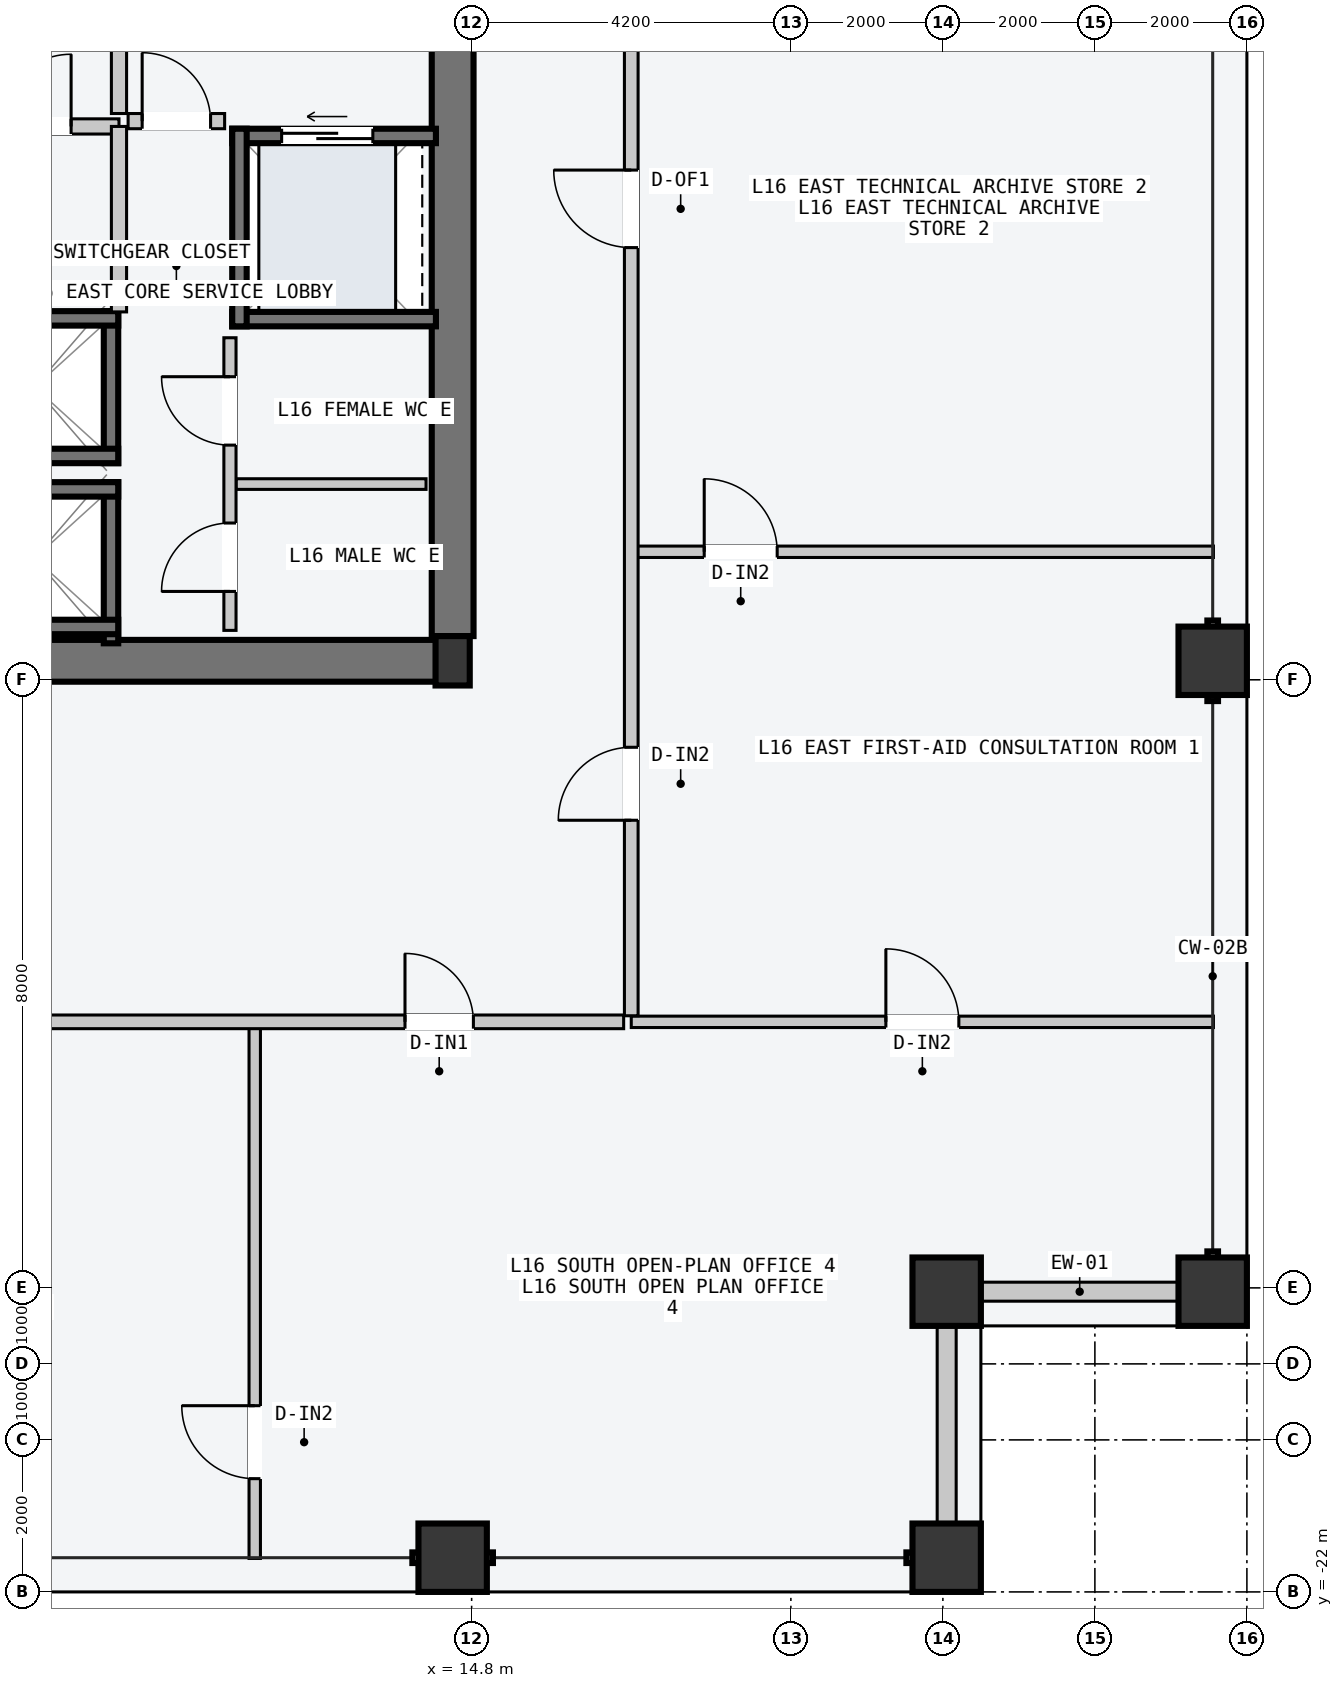
"""IFC4 building model, lengths in metres.
Left out: names, types, materials, properties, quantities, classifications, styles, units other than length and angle.
Written with IfcOpenShell. Run it as: python <this file> out.ifc"""

import sys

from ifc_helpers import new_model, si_unit, direction, frame, frame_2d, origin, origin_2d, place, context, subcontext, project, spatial, rectangle, hollow_rectangle, i_section, extrude, element, fill, save


model = new_model("IFC4")
c1 = context("Model", 3, precision=1e-05, world=origin(), true_north=direction((0.0, 1.0)))
c2 = subcontext(c1, "Body", "Model", "MODEL_VIEW")
j1 = project(units=[si_unit("LENGTHUNIT", "METRE"), si_unit("PLANEANGLEUNIT", "RADIAN")], contexts=[c1])
p1 = place(None, origin())
s1 = spatial("IfcSite", under=j1, at=p1, CompositionType="ELEMENT")
p2 = place(p1, origin())
s2 = spatial("IfcBuilding", under=s1, at=p2, CompositionType="ELEMENT")
p3 = place(p2, frame((0.0, 0.0, 63.6)))
s3 = spatial("IfcBuildingStorey", under=s2, at=p3, CompositionType="ELEMENT", Elevation=63.6)
p4 = place(p3, frame((8.07, -9.75, -0.2), z_axis=(0.0, 0.0, 1.0), x_axis=(1.0, 0.0, 0.0)))
e1 = element("IfcWall", 1, at=p4, inside=s3, PredefinedType="SHEAR", context=c2, shape_type="SweptSolid", body=[
    extrude(rectangle(XDim=6.46, YDim=0.55, at=frame_2d((3.23, 0.0))), origin(), (0.0, 0.0, 1.0), 3.6),
])
p5 = place(p3, frame((14.55, -9.425, -0.2), z_axis=(0.0, 0.0, 1.0), x_axis=(0.0, 1.0, 0.0)))
e2 = element("IfcWall", 2, at=p5, inside=s3, PredefinedType="SHEAR", context=c2, shape_type="SweptSolid", body=[
    extrude(rectangle(XDim=9.1, YDim=0.55, at=frame_2d((4.55, 0.0))), origin(), (0.0, 0.0, 1.0), 3.6),
])
p6 = place(p3, frame((14.55, -9.75, 0.0), z_axis=(0.0, 0.0, 1.0), x_axis=(1.0, 0.0, 0.0)))
e3 = element("IfcColumn", 3, at=p6, inside=s3, PredefinedType="COLUMN", context=c2, shape_type="SweptSolid", body=[
    extrude(i_section(OverallWidth=0.45, OverallDepth=0.65, WebThickness=0.025, FlangeThickness=0.04, at=origin_2d()), origin(), (0.0, 0.0, 1.0), 3.6),
])
for number, where, z_axis, x_axis in (
    (4, (14.55, -21.55, 0.0), (0.0, 0.0, 1.0), (1.0, 0.0, 0.0)),
    (5, (21.05, -21.55, 0.0), (0.0, 0.0, 1.0), (1.0, 0.0, 0.0)),
    (6, (24.55, -18.05, 0.0), (0.0, 0.0, 1.0), (0.0, 1.0, 0.0)),
    (7, (24.55, -9.75, 0.0), (0.0, 0.0, 1.0), (0.0, 1.0, 0.0)),
    (8, (21.05, -18.05, 0.0), (0.0, 0.0, 1.0), (1.0, 0.0, 0.0)),
):
    element("IfcColumn", number, at=place(p3, frame(where, z_axis=z_axis, x_axis=x_axis)), inside=s3, PredefinedType="COLUMN", context=c2, shape_type="SweptSolid", body=[
        extrude(hollow_rectangle(XDim=0.9, YDim=0.9, WallThickness=0.045, at=origin_2d()), origin(), (0.0, 0.0, 1.0), 3.6),
    ])
for number, where, z_axis, x_axis in (
    (9, (21.51, -18.05, 0.0), (0.0, 0.0, 1.0), (1.0, 0.0, 0.0)),
    (10, (21.05, -21.09, 0.0), (0.0, 0.0, 1.0), (0.0, 1.0, 0.0)),
):
    element("IfcWall", number, at=place(p3, frame(where, z_axis=z_axis, x_axis=x_axis)), inside=s3, PredefinedType="STANDARD", context=c2, shape_type="SweptSolid", body=[
        extrude(rectangle(XDim=2.58, YDim=0.25, at=frame_2d((1.29, 0.0))), origin(), (0.0, 0.0, 1.0), 2.7),
    ])
p7 = place(p3, frame((10.055, -9.52, -0.2), z_axis=(0.0, 0.0, 1.0), x_axis=(0.0, 1.0, 0.0)))
e11 = element("IfcWall", 11, at=p7, inside=s3, PredefinedType="SOLIDWALL", context=c2, shape_type="SweptSolid", body=[
    extrude(rectangle(XDim=2.12, YDim=0.19, at=frame_2d((1.06, 0.0))), origin(), (0.0, 0.0, 1.0), 3.6),
])
for number, where, z_axis, x_axis in (
    (12, (7.95, -7.495, -0.2), (0.0, 0.0, 1.0), (1.0, 0.0, 0.0)),
    (13, (7.95, -9.305, -0.2), (0.0, 0.0, 1.0), (1.0, 0.0, 0.0)),
):
    element("IfcWall", number, at=place(p3, frame(where, z_axis=z_axis, x_axis=x_axis)), inside=s3, PredefinedType="SOLIDWALL", context=c2, shape_type="SweptSolid", body=[
        extrude(rectangle(XDim=2.2, YDim=0.19, at=frame_2d((1.1, 0.0))), origin(), (0.0, 0.0, 1.0), 3.6),
    ])
p8 = place(p3, frame((10.055, -7.15, -0.2), z_axis=(0.0, 0.0, 1.0), x_axis=(0.0, 1.0, 0.0)))
e14 = element("IfcWall", 14, at=p8, inside=s3, PredefinedType="SOLIDWALL", context=c2, shape_type="SweptSolid", body=[
    extrude(rectangle(XDim=2.0, YDim=0.19, at=frame_2d((1.0, 0.0))), origin(), (0.0, 0.0, 1.0), 3.6),
])
for number, where, z_axis, x_axis in (
    (15, (7.95, -5.245, -0.2), (0.0, 0.0, 1.0), (1.0, 0.0, 0.0)),
    (16, (7.95, -7.055, -0.2), (0.0, 0.0, 1.0), (1.0, 0.0, 0.0)),
):
    element("IfcWall", number, at=place(p3, frame(where, z_axis=z_axis, x_axis=x_axis)), inside=s3, PredefinedType="SOLIDWALL", context=c2, shape_type="SweptSolid", body=[
        extrude(rectangle(XDim=2.2, YDim=0.19, at=frame_2d((1.1, 0.0))), origin(), (0.0, 0.0, 1.0), 3.6),
    ])
p9 = place(p3, frame((11.65, -2.845, -0.2), z_axis=(0.0, 0.0, 1.0), x_axis=(1.0, 0.0, 0.0)))
e17 = element("IfcWall", 17, at=p9, inside=s3, PredefinedType="SOLIDWALL", context=c2, shape_type="SweptSolid", body=[
    extrude(rectangle(XDim=2.68, YDim=0.19, at=frame_2d((1.34, 0.0))), origin(), (0.0, 0.0, 1.0), 3.6),
])
p10 = place(p9, frame((0.65, 0.0, 0.2)))
e18 = element("IfcOpeningElement", 18, at=p10, cuts=e17, PredefinedType="OPENING", context=c2, shape_type="SweptSolid", body=[
    extrude(rectangle(XDim=1.2, YDim=2.2, at=frame_2d((0.6, 1.1))), frame((0.0, 0.105, 0.0), z_axis=(0.0, -1.0, 0.0), x_axis=(1.0, 0.0, 0.0)), (0.0, 0.0, 1.0), 0.21),
])
p11 = place(p3, frame((11.65, -5.255, -0.2), z_axis=(0.0, 0.0, 1.0), x_axis=(1.0, 0.0, 0.0)))
e19 = element("IfcWall", 19, at=p11, inside=s3, PredefinedType="SOLIDWALL", context=c2, shape_type="SweptSolid", body=[
    extrude(rectangle(XDim=2.68, YDim=0.19, at=frame_2d((1.34, 0.0))), origin(), (0.0, 0.0, 1.0), 3.6),
])
p12 = place(p3, frame((11.745, -5.35, -0.2), z_axis=(0.0, 0.0, 1.0), x_axis=(0.0, 1.0, 0.0)))
e20 = element("IfcWall", 20, at=p12, inside=s3, PredefinedType="SOLIDWALL", context=c2, shape_type="SweptSolid", body=[
    extrude(rectangle(XDim=2.6, YDim=0.19, at=frame_2d((1.3, 0.0))), origin(), (0.0, 0.0, 1.0), 3.6),
])
p13 = place(p3, frame((10.16, -2.55, 0.0), z_axis=(0.0, 0.0, 1.0), x_axis=(0.0, 1.0, 0.0)))
e21 = element("IfcWall", 21, at=p13, inside=s3, PredefinedType="PARTITIONING", context=c2, shape_type="SweptSolid", body=[
    extrude(rectangle(XDim=3.4, YDim=0.2, at=frame_2d((1.7, 0.0))), origin(), (0.0, 0.0, 1.0), 3.4),
])
p14 = place(p13, frame((1.3, 0.0, 0.0)))
e22 = element("IfcOpeningElement", 22, at=p14, cuts=e21, PredefinedType="OPENING", context=c2, shape_type="SweptSolid", body=[
    extrude(rectangle(XDim=1.1, YDim=2.15, at=frame_2d((0.55, 1.075))), frame((0.0, 0.11, 0.0), z_axis=(0.0, -1.0, 0.0), x_axis=(1.0, 0.0, 0.0)), (0.0, 0.0, 1.0), 0.22),
])
p15 = place(p3, frame((10.28, -2.65, 0.0), z_axis=(0.0, 0.0, 1.0), x_axis=(1.0, 0.0, 0.0)))
e23 = element("IfcWall", 23, at=p15, inside=s3, PredefinedType="PARTITIONING", context=c2, shape_type="SweptSolid", body=[
    extrude(rectangle(XDim=1.27, YDim=0.2, at=frame_2d((0.635, 0.0))), origin(), (0.0, 0.0, 1.0), 3.4),
])
p16 = place(p15, frame((0.185, 0.0, 0.0)))
e24 = element("IfcOpeningElement", 24, at=p16, cuts=e23, PredefinedType="OPENING", context=c2, shape_type="SweptSolid", body=[
    extrude(rectangle(XDim=0.9, YDim=2.15, at=frame_2d((0.45, 1.075))), frame((0.0, 0.11, 0.0), z_axis=(0.0, -1.0, 0.0), x_axis=(1.0, 0.0, 0.0)), (0.0, 0.0, 1.0), 0.22),
])
p17 = place(p3, frame((7.96, -2.72, 0.0), z_axis=(0.0, 0.0, 1.0), x_axis=(1.0, 0.0, 0.0)))
e25 = element("IfcWall", 25, at=p17, inside=s3, PredefinedType="PARTITIONING", context=c2, shape_type="SweptSolid", body=[
    extrude(rectangle(XDim=2.2, YDim=0.2, at=frame_2d((1.1, 0.0))), origin(), (0.0, 0.0, 1.0), 3.4),
])
p18 = place(p17, frame((0.62, 0.0, 0.0)))
e26 = element("IfcOpeningElement", 26, at=p18, cuts=e25, PredefinedType="OPENING", context=c2, shape_type="SweptSolid", body=[
    extrude(rectangle(XDim=0.95, YDim=2.1, at=frame_2d((0.475, 1.05))), frame((0.0, 0.11, 0.0), z_axis=(0.0, -1.0, 0.0), x_axis=(1.0, 0.0, 0.0)), (0.0, 0.0, 1.0), 0.22),
])
p19 = place(p3, frame((10.16, -5.16, 0.0), z_axis=(0.0, 0.0, 1.0), x_axis=(0.0, 1.0, 0.0)))
e27 = element("IfcWall", 27, at=p19, inside=s3, PredefinedType="PARTITIONING", context=c2, shape_type="SweptSolid", body=[
    extrude(rectangle(XDim=2.44, YDim=0.2, at=frame_2d((1.22, 0.0))), origin(), (0.0, 0.0, 1.0), 3.4),
])
p20 = place(p3, frame((11.7, -7.425, 0.0), z_axis=(0.0, 0.0, 1.0), x_axis=(1.0, 0.0, 0.0)))
e28 = element("IfcWall", 28, at=p20, inside=s3, PredefinedType="PARTITIONING", context=c2, shape_type="SweptSolid", body=[
    extrude(rectangle(XDim=2.5, YDim=0.14, at=frame_2d((1.25, 0.0))), origin(), (0.0, 0.0, 1.0), 3.4),
])
p21 = place(p3, frame((11.62, -9.35, 0.0), z_axis=(0.0, 0.0, 1.0), x_axis=(0.0, 1.0, 0.0)))
e29 = element("IfcWall", 29, at=p21, inside=s3, PredefinedType="PARTITIONING", context=c2, shape_type="SweptSolid", body=[
    extrude(rectangle(XDim=3.85, YDim=0.16, at=frame_2d((1.925, 0.0))), origin(), (0.0, 0.0, 1.0), 3.4),
])
p22 = place(p21, frame((0.512, 0.0, 0.0)))
e30 = element("IfcOpeningElement", 30, at=p22, cuts=e29, PredefinedType="OPENING", context=c2, shape_type="SweptSolid", body=[
    extrude(rectangle(XDim=0.9, YDim=2.15, at=frame_2d((0.45, 1.075))), frame((0.0, 0.09, 0.0), z_axis=(0.0, -1.0, 0.0), x_axis=(1.0, 0.0, 0.0)), (0.0, 0.0, 1.0), 0.18),
])
p23 = place(p21, frame((2.438, 0.0, 0.0)))
e31 = element("IfcOpeningElement", 31, at=p23, cuts=e29, PredefinedType="OPENING", context=c2, shape_type="SweptSolid", body=[
    extrude(rectangle(XDim=0.9, YDim=2.15, at=frame_2d((0.45, 1.075))), frame((0.0, 0.09, 0.0), z_axis=(0.0, -1.0, 0.0), x_axis=(1.0, 0.0, 0.0)), (0.0, 0.0, 1.0), 0.18),
])
p24 = place(p3, frame((11.946, -21.56, 0.0), z_axis=(0.0, 0.0, 1.0), x_axis=(0.0, 1.0, 0.0)))
e32 = element("IfcWall", 32, at=p24, inside=s3, PredefinedType="PARTITIONING", context=c2, shape_type="SweptSolid", body=[
    extrude(rectangle(XDim=7.0, YDim=0.15, at=frame_2d((3.5, 0.0))), origin(), (0.0, 0.0, 1.0), 3.4),
])
p25 = place(p24, frame((1.05, 0.0, 0.0)))
e33 = element("IfcOpeningElement", 33, at=p25, cuts=e32, PredefinedType="OPENING", context=c2, shape_type="SweptSolid", body=[
    extrude(rectangle(XDim=0.96, YDim=2.18, at=frame_2d((0.48, 1.09))), frame((0.0, 0.085, 0.0), z_axis=(0.0, -1.0, 0.0), x_axis=(1.0, 0.0, 0.0)), (0.0, 0.0, 1.0), 0.17),
])
p26 = place(p3, frame((-16.8, -14.5, 0.0), z_axis=(0.0, 0.0, 1.0), x_axis=(1.0, 0.0, 0.0)))
e34 = element("IfcWall", 34, at=p26, inside=s3, PredefinedType="PARTITIONING", context=c2, shape_type="SweptSolid", body=[
    extrude(rectangle(XDim=33.6, YDim=0.18, at=frame_2d((16.8, 0.0))), origin(), (0.0, 0.0, 1.0), 3.4),
])
p27 = place(p26, frame((4.087, 0.0, 0.0)))
e35 = element("IfcOpeningElement", 35, at=p27, cuts=e34, PredefinedType="OPENING", context=c2, shape_type="SweptSolid", body=[
    extrude(rectangle(XDim=1.06, YDim=2.2, at=frame_2d((0.53, 1.1))), frame((0.0, 0.1, 0.0), z_axis=(0.0, -1.0, 0.0), x_axis=(1.0, 0.0, 0.0)), (0.0, 0.0, 1.0), 0.2),
])
p28 = place(p26, frame((13.791, 0.0, 0.0)))
e36 = element("IfcOpeningElement", 36, at=p28, cuts=e34, PredefinedType="OPENING", context=c2, shape_type="SweptSolid", body=[
    extrude(rectangle(XDim=1.24, YDim=2.24, at=frame_2d((0.62, 1.12))), frame((0.0, 0.1, 0.0), z_axis=(0.0, -1.0, 0.0), x_axis=(1.0, 0.0, 0.0)), (0.0, 0.0, 1.0), 0.2),
])
p29 = place(p26, frame((23.467, 0.0, 0.0)))
e37 = element("IfcOpeningElement", 37, at=p29, cuts=e34, PredefinedType="OPENING", context=c2, shape_type="SweptSolid", body=[
    extrude(rectangle(XDim=1.4, YDim=2.2, at=frame_2d((0.7, 1.1))), frame((0.0, 0.1, 0.0), z_axis=(0.0, -1.0, 0.0), x_axis=(1.0, 0.0, 0.0)), (0.0, 0.0, 1.0), 0.2),
])
p30 = place(p26, frame((30.723, 0.0, 0.0)))
e38 = element("IfcOpeningElement", 38, at=p30, cuts=e34, PredefinedType="OPENING", context=c2, shape_type="SweptSolid", body=[
    extrude(rectangle(XDim=0.9, YDim=2.15, at=frame_2d((0.45, 1.075))), frame((0.0, 0.1, 0.0), z_axis=(0.0, -1.0, 0.0), x_axis=(1.0, 0.0, 0.0)), (0.0, 0.0, 1.0), 0.2),
])
p31 = place(p3, frame((16.9, -14.5, 0.0), z_axis=(0.0, 0.0, 1.0), x_axis=(1.0, 0.0, 0.0)))
e39 = element("IfcWall", 39, at=p31, inside=s3, PredefinedType="PARTITIONING", context=c2, shape_type="SweptSolid", body=[
    extrude(rectangle(XDim=7.66, YDim=0.15, at=frame_2d((3.83, 0.0))), origin(), (0.0, 0.0, 1.0), 3.4),
])
p32 = place(p31, frame((3.35, 0.0, 0.0)))
e40 = element("IfcOpeningElement", 40, at=p32, cuts=e39, PredefinedType="OPENING", context=c2, shape_type="SweptSolid", body=[
    extrude(rectangle(XDim=0.96, YDim=2.18, at=frame_2d((0.48, 1.09))), frame((0.0, 0.085, 0.0), z_axis=(0.0, -1.0, 0.0), x_axis=(1.0, 0.0, 0.0)), (0.0, 0.0, 1.0), 0.17),
])
p33 = place(p3, frame((16.96, -8.316, 0.0), z_axis=(0.0, 0.0, 1.0), x_axis=(1.0, 0.0, 0.0)))
e41 = element("IfcWall", 41, at=p33, inside=s3, PredefinedType="PARTITIONING", context=c2, shape_type="SweptSolid", body=[
    extrude(rectangle(XDim=7.6, YDim=0.15, at=frame_2d((3.8, 0.0))), origin(), (0.0, 0.0, 1.0), 3.4),
])
p34 = place(p33, frame((0.9, 0.0, 0.0)))
e42 = element("IfcOpeningElement", 42, at=p34, cuts=e41, PredefinedType="OPENING", context=c2, shape_type="SweptSolid", body=[
    extrude(rectangle(XDim=0.96, YDim=2.18, at=frame_2d((0.48, 1.09))), frame((0.0, 0.085, 0.0), z_axis=(0.0, -1.0, 0.0), x_axis=(1.0, 0.0, 0.0)), (0.0, 0.0, 1.0), 0.17),
])
p35 = place(p3, frame((16.9, -14.42, 0.0), z_axis=(0.0, 0.0, 1.0), x_axis=(0.0, 1.0, 0.0)))
e43 = element("IfcWall", 43, at=p35, inside=s3, PredefinedType="PARTITIONING", context=c2, shape_type="SweptSolid", body=[
    extrude(rectangle(XDim=26.54, YDim=0.18, at=frame_2d((13.27, 0.0))), origin(), (0.0, 0.0, 1.0), 3.4),
])
p36 = place(p35, frame((2.572, 0.0, 0.0)))
e44 = element("IfcOpeningElement", 44, at=p36, cuts=e43, PredefinedType="OPENING", context=c2, shape_type="SweptSolid", body=[
    extrude(rectangle(XDim=0.96, YDim=2.18, at=frame_2d((0.48, 1.09))), frame((0.0, 0.1, 0.0), z_axis=(0.0, -1.0, 0.0), x_axis=(1.0, 0.0, 0.0)), (0.0, 0.0, 1.0), 0.2),
])
p37 = place(p35, frame((10.106, 0.0, 0.0)))
e45 = element("IfcOpeningElement", 45, at=p37, cuts=e43, PredefinedType="OPENING", context=c2, shape_type="SweptSolid", body=[
    extrude(rectangle(XDim=1.02, YDim=2.2, at=frame_2d((0.51, 1.1))), frame((0.0, 0.1, 0.0), z_axis=(0.0, -1.0, 0.0), x_axis=(1.0, 0.0, 0.0)), (0.0, 0.0, 1.0), 0.2),
])
p38 = place(p35, frame((20.304, 0.0, 0.0)))
e46 = element("IfcOpeningElement", 46, at=p38, cuts=e43, PredefinedType="OPENING", context=c2, shape_type="SweptSolid", body=[
    extrude(rectangle(XDim=1.06, YDim=2.2, at=frame_2d((0.53, 1.1))), frame((0.0, 0.1, 0.0), z_axis=(0.0, -1.0, 0.0), x_axis=(1.0, 0.0, 0.0)), (0.0, 0.0, 1.0), 0.2),
])
p39 = place(p10, origin())
e47 = element("IfcDoor", 47, at=p39, inside=s3, OperationType="SLIDING_TO_LEFT", PredefinedType="DOOR", context=c2, shape_type="SweptSolid", body=[
    extrude(rectangle(XDim=1.2, YDim=2.2, at=frame_2d((0.6, 1.1))), frame((0.0, 0.025, 0.0), z_axis=(0.0, -1.0, 0.0), x_axis=(1.0, 0.0, 0.0)), (0.0, 0.0, 1.0), 0.05),
])
fill(e18, e47)
p40 = place(p16, origin())
e48 = element("IfcDoor", 48, at=p40, inside=s3, OperationType="SINGLE_SWING_LEFT", PredefinedType="DOOR", context=c2, shape_type="SweptSolid", body=[
    extrude(rectangle(XDim=0.9, YDim=2.15, at=frame_2d((0.45, 1.075))), frame((0.0, 0.025, 0.0), z_axis=(0.0, -1.0, 0.0), x_axis=(1.0, 0.0, 0.0)), (0.0, 0.0, 1.0), 0.05),
])
fill(e24, e48)
p41 = place(p18, origin())
e49 = element("IfcDoor", 49, at=p41, inside=s3, OperationType="SINGLE_SWING_RIGHT", PredefinedType="DOOR", context=c2, shape_type="SweptSolid", body=[
    extrude(rectangle(XDim=0.95, YDim=2.1, at=frame_2d((0.475, 1.05))), frame((0.0, 0.025, 0.0), z_axis=(0.0, -1.0, 0.0), x_axis=(1.0, 0.0, 0.0)), (0.0, 0.0, 1.0), 0.05),
])
fill(e26, e49)
p42 = place(p22, origin())
e50 = element("IfcDoor", 50, at=p42, inside=s3, OperationType="SINGLE_SWING_LEFT", PredefinedType="DOOR", context=c2, shape_type="SweptSolid", body=[
    extrude(rectangle(XDim=0.9, YDim=2.15, at=frame_2d((0.45, 1.075))), frame((0.0, 0.025, 0.0), z_axis=(0.0, -1.0, 0.0), x_axis=(1.0, 0.0, 0.0)), (0.0, 0.0, 1.0), 0.05),
])
fill(e30, e50)
p43 = place(p23, origin())
e51 = element("IfcDoor", 51, at=p43, inside=s3, OperationType="SINGLE_SWING_RIGHT", PredefinedType="DOOR", context=c2, shape_type="SweptSolid", body=[
    extrude(rectangle(XDim=0.9, YDim=2.15, at=frame_2d((0.45, 1.075))), frame((0.0, 0.025, 0.0), z_axis=(0.0, -1.0, 0.0), x_axis=(1.0, 0.0, 0.0)), (0.0, 0.0, 1.0), 0.05),
])
fill(e31, e51)
p44 = place(p25, origin())
e52 = element("IfcDoor", 52, at=p44, inside=s3, OperationType="SINGLE_SWING_RIGHT", PredefinedType="DOOR", context=c2, shape_type="SweptSolid", body=[
    extrude(rectangle(XDim=0.96, YDim=2.18, at=frame_2d((0.48, 1.09))), frame((0.0, 0.025, 0.0), z_axis=(0.0, -1.0, 0.0), x_axis=(1.0, 0.0, 0.0)), (0.0, 0.0, 1.0), 0.05),
])
fill(e33, e52)
p45 = place(p30, origin())
e53 = element("IfcDoor", 53, at=p45, inside=s3, OperationType="SINGLE_SWING_LEFT", PredefinedType="DOOR", context=c2, shape_type="SweptSolid", body=[
    extrude(rectangle(XDim=0.9, YDim=2.15, at=frame_2d((0.45, 1.075))), frame((0.0, 0.025, 0.0), z_axis=(0.0, -1.0, 0.0), x_axis=(1.0, 0.0, 0.0)), (0.0, 0.0, 1.0), 0.05),
])
fill(e38, e53)
p46 = place(p32, origin())
e54 = element("IfcDoor", 54, at=p46, inside=s3, OperationType="SINGLE_SWING_LEFT", PredefinedType="DOOR", context=c2, shape_type="SweptSolid", body=[
    extrude(rectangle(XDim=0.96, YDim=2.18, at=frame_2d((0.48, 1.09))), frame((0.0, 0.025, 0.0), z_axis=(0.0, -1.0, 0.0), x_axis=(1.0, 0.0, 0.0)), (0.0, 0.0, 1.0), 0.05),
])
fill(e40, e54)
p47 = place(p34, origin())
e55 = element("IfcDoor", 55, at=p47, inside=s3, OperationType="SINGLE_SWING_LEFT", PredefinedType="DOOR", context=c2, shape_type="SweptSolid", body=[
    extrude(rectangle(XDim=0.96, YDim=2.18, at=frame_2d((0.48, 1.09))), frame((0.0, 0.025, 0.0), z_axis=(0.0, -1.0, 0.0), x_axis=(1.0, 0.0, 0.0)), (0.0, 0.0, 1.0), 0.05),
])
fill(e42, e55)
p48 = place(p36, origin())
e56 = element("IfcDoor", 56, at=p48, inside=s3, OperationType="SINGLE_SWING_LEFT", PredefinedType="DOOR", context=c2, shape_type="SweptSolid", body=[
    extrude(rectangle(XDim=0.96, YDim=2.18, at=frame_2d((0.48, 1.09))), frame((0.0, 0.025, 0.0), z_axis=(0.0, -1.0, 0.0), x_axis=(1.0, 0.0, 0.0)), (0.0, 0.0, 1.0), 0.05),
])
fill(e44, e56)
p49 = place(p37, origin())
e57 = element("IfcDoor", 57, at=p49, inside=s3, OperationType="SINGLE_SWING_RIGHT", PredefinedType="DOOR", context=c2, shape_type="SweptSolid", body=[
    extrude(rectangle(XDim=1.02, YDim=2.2, at=frame_2d((0.51, 1.1))), frame((0.0, 0.025, 0.0), z_axis=(0.0, -1.0, 0.0), x_axis=(1.0, 0.0, 0.0)), (0.0, 0.0, 1.0), 0.05),
])
fill(e45, e57)
save(model, sys.argv[1])
